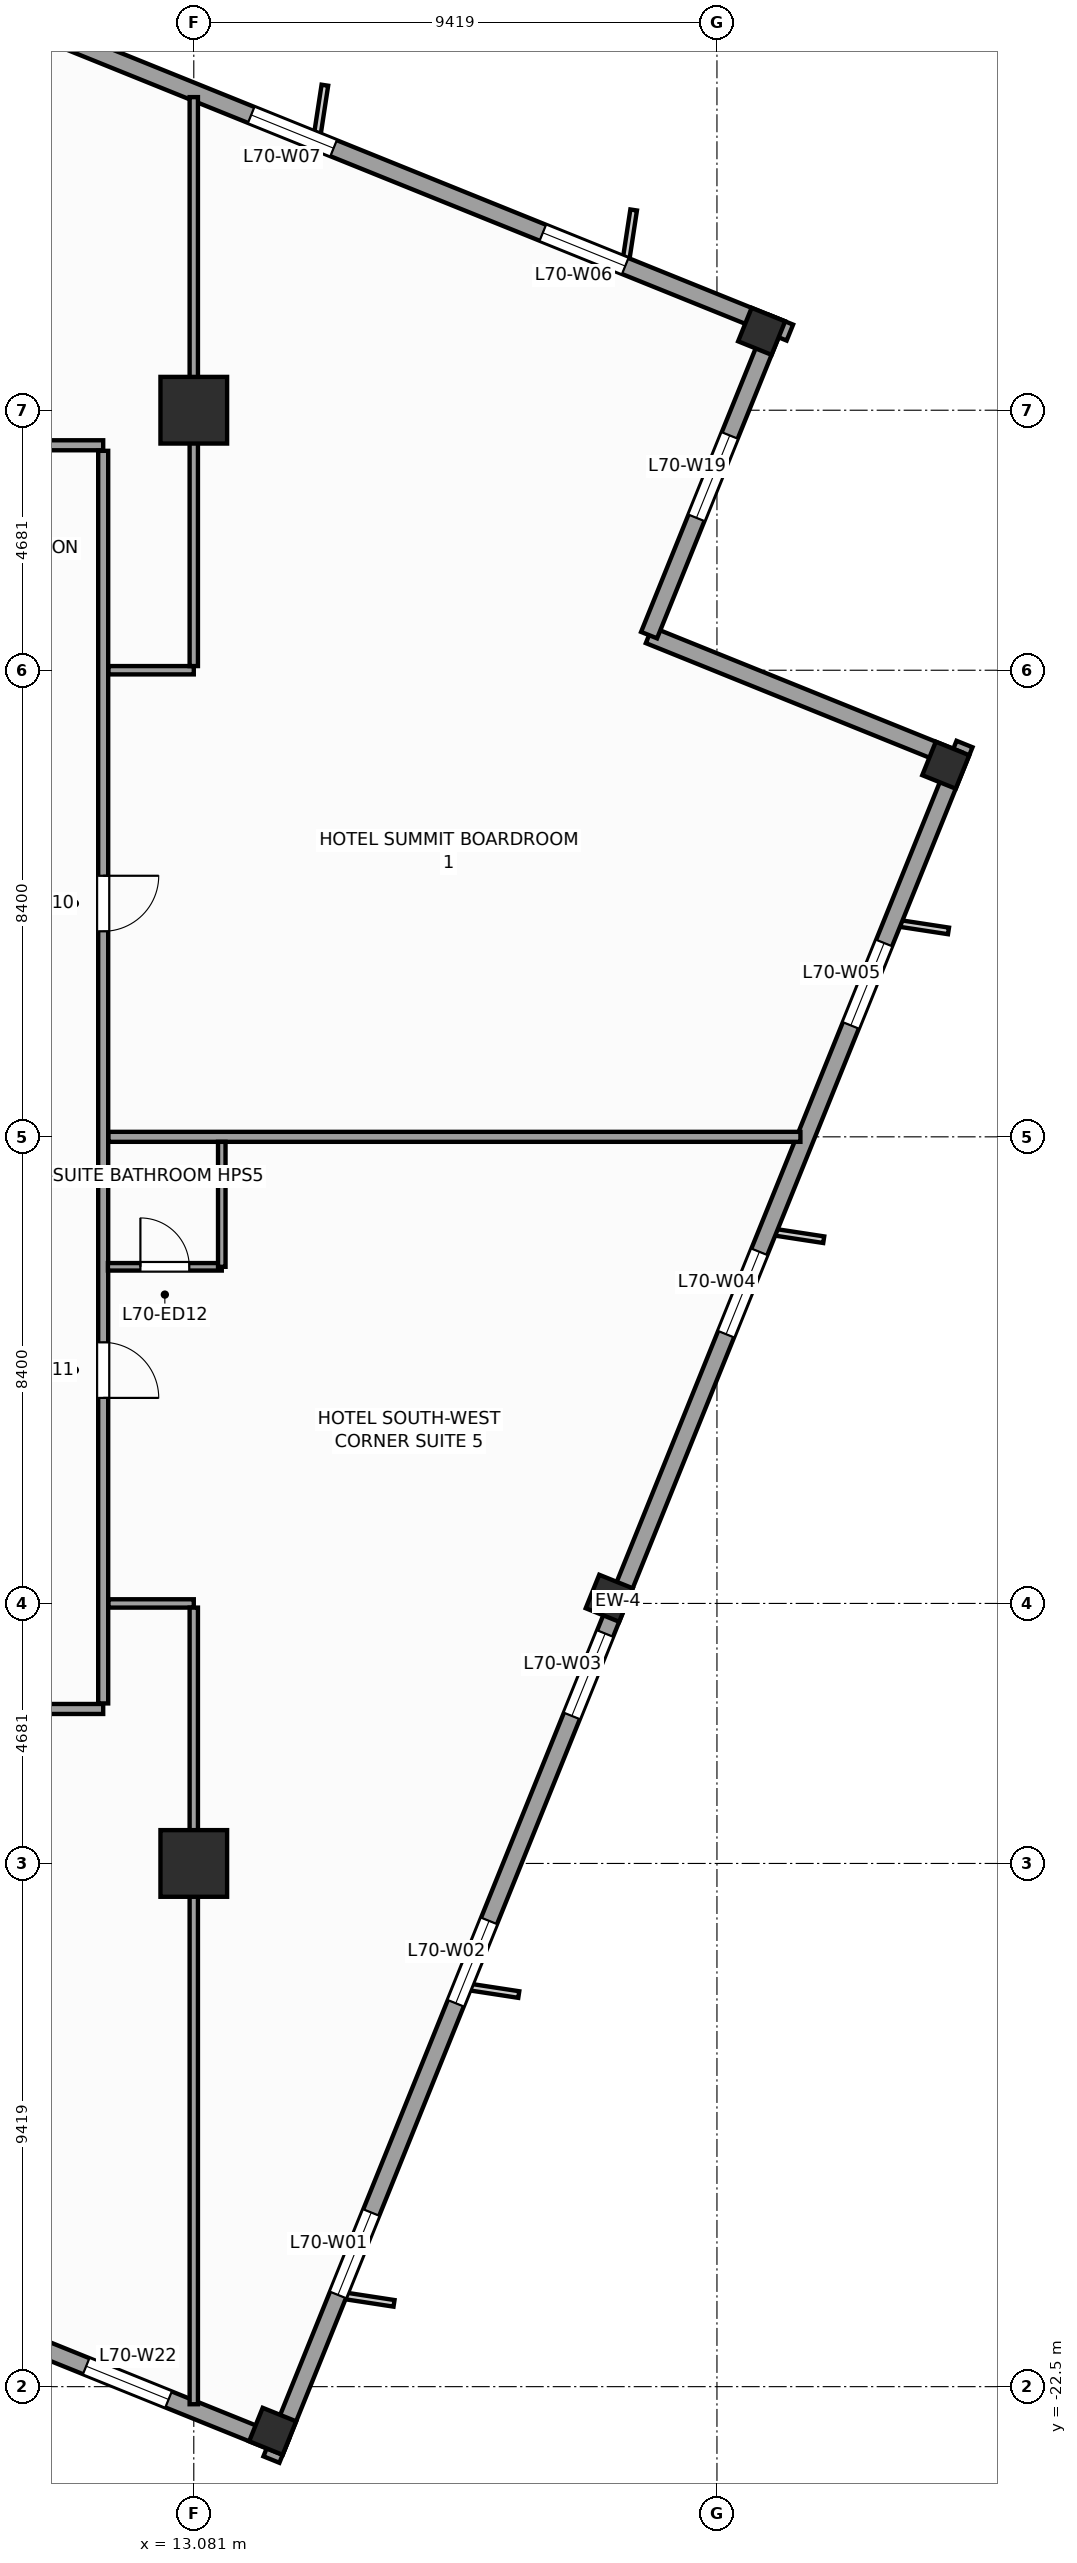
"""IFC4 building model, lengths in metres.
Left out: names, types, materials, properties, quantities, classifications, styles, units other than length and angle.
Written with IfcOpenShell. Run it as: python <this file> out.ifc"""

import sys

from ifc_helpers import new_model, si_unit, direction, frame, frame_2d, origin, origin_2d, place, context, subcontext, project, spatial, rectangle, extrude, source, transform, mapped, element, fill, save


model = new_model("IFC4")
c1 = context("Model", 3, precision=1e-05, world=origin(), true_north=direction((0.0, 1.0)))
c2 = subcontext(c1, "Body", "Model", "MODEL_VIEW")
j1 = project(units=[si_unit("LENGTHUNIT", "METRE"), si_unit("PLANEANGLEUNIT", "RADIAN")], contexts=[c1])
p1 = place(None, origin())
s1 = spatial("IfcSite", under=j1, at=p1, CompositionType="ELEMENT")
p2 = place(p1, origin())
s2 = spatial("IfcBuilding", under=s1, at=p2, CompositionType="ELEMENT")
p3 = place(p2, frame((0.0, 0.0, 286.8)))
s3 = spatial("IfcBuildingStorey", under=s2, at=p3, CompositionType="ELEMENT", Elevation=286.8)
m1 = source(origin(), c2, "Body", "SweptSolid", [
    extrude(rectangle(XDim=1.2, YDim=1.2, at=origin_2d()), origin(), (0.0, 0.0, 1.0), 3.6),
])
for number, where, z_axis, x_axis in (
    (1, (13.081, -13.081, 0.0), (0.0, 0.0, 1.0), (1.0, 0.0, 0.0)),
    (2, (13.081, 13.081, 0.0), (0.0, 0.0, 1.0), (1.0, 0.0, 0.0)),
):
    element("IfcColumn", number, at=place(p3, frame(where, z_axis=z_axis, x_axis=x_axis)), inside=s3, PredefinedType="COLUMN", context=c2, shape_type="MappedRepresentation", body=[
        mapped(m1, transform((0.0, 0.0, 0.0), scale=1.0)),
    ])
m2 = source(origin(), c2, "Body", "SweptSolid", [
    extrude(rectangle(XDim=0.65, YDim=0.65, at=origin_2d()), origin(), (0.0, 0.0, 1.0), 3.6),
])
for number, where, z_axis, x_axis in (
    (3, (14.501, -23.304, 0.0), (0.0, 0.0, 1.0), (0.375, 0.927, 0.0)),
    (4, (20.56, -8.307, 0.0), (0.0, 0.0, 1.0), (0.375, 0.927, 0.0)),
    (5, (26.62, 6.69, 0.0), (0.0, 0.0, 1.0), (0.375, 0.927, 0.0)),
    (6, (23.304, 14.501, 0.0), (0.0, 0.0, 1.0), (0.375, 0.927, 0.0)),
):
    element("IfcColumn", number, at=place(p3, frame(where, z_axis=z_axis, x_axis=x_axis)), inside=s3, PredefinedType="COLUMN", context=c2, shape_type="MappedRepresentation", body=[
        mapped(m2, transform((0.0, 0.0, 0.0), scale=1.0)),
    ])
p4 = place(p3, frame((14.479, -23.813, 0.0), z_axis=(0.0, 0.0, 1.0), x_axis=(0.374609557019, 0.927182657188, 0.0)))
e7 = element("IfcWall", 7, at=p4, inside=s3, PredefinedType="STANDARD", context=c2, shape_type="SweptSolid", body=[
    extrude(rectangle(XDim=33.31, YDim=0.31, at=frame_2d((16.655, 0.0))), origin(), (0.0, 0.0, 1.0), 2.75),
])
p5 = place(p4, frame((3.197, 0.0, 0.47)))
e8 = element("IfcOpeningElement", 8, at=p5, cuts=e7, PredefinedType="OPENING", context=c2, shape_type="SweptSolid", body=[
    extrude(rectangle(XDim=1.6, YDim=2.1, at=frame_2d((0.8, 1.05))), frame((0.0, 0.165, 0.0), z_axis=(0.0, -1.0, 0.0), x_axis=(1.0, 0.0, 0.0)), (0.0, 0.0, 1.0), 0.33),
])
p6 = place(p4, frame((8.86, 0.0, 0.47)))
e9 = element("IfcOpeningElement", 9, at=p6, cuts=e7, PredefinedType="OPENING", context=c2, shape_type="SweptSolid", body=[
    extrude(rectangle(XDim=1.6, YDim=2.1, at=frame_2d((0.8, 1.05))), frame((0.0, 0.165, 0.0), z_axis=(0.0, -1.0, 0.0), x_axis=(1.0, 0.0, 0.0)), (0.0, 0.0, 1.0), 0.33),
])
p7 = place(p4, frame((14.439, 0.0, 0.47)))
e10 = element("IfcOpeningElement", 10, at=p7, cuts=e7, PredefinedType="OPENING", context=c2, shape_type="SweptSolid", body=[
    extrude(rectangle(XDim=1.6, YDim=2.1, at=frame_2d((0.8, 1.05))), frame((0.0, 0.165, 0.0), z_axis=(0.0, -1.0, 0.0), x_axis=(1.0, 0.0, 0.0)), (0.0, 0.0, 1.0), 0.33),
])
p8 = place(p4, frame((21.851, 0.0, 0.47)))
e11 = element("IfcOpeningElement", 11, at=p8, cuts=e7, PredefinedType="OPENING", context=c2, shape_type="SweptSolid", body=[
    extrude(rectangle(XDim=1.6, YDim=2.1, at=frame_2d((0.8, 1.05))), frame((0.0, 0.165, 0.0), z_axis=(0.0, -1.0, 0.0), x_axis=(1.0, 0.0, 0.0)), (0.0, 0.0, 1.0), 0.33),
])
p9 = place(p4, frame((27.847, 0.0, 0.47)))
e12 = element("IfcOpeningElement", 12, at=p9, cuts=e7, PredefinedType="OPENING", context=c2, shape_type="SweptSolid", body=[
    extrude(rectangle(XDim=1.6, YDim=2.1, at=frame_2d((0.8, 1.05))), frame((0.0, 0.165, 0.0), z_axis=(0.0, -1.0, 0.0), x_axis=(1.0, 0.0, 0.0)), (0.0, 0.0, 1.0), 0.33),
])
p10 = place(p3, frame((26.841, 6.784, 0.0), z_axis=(0.0, 0.0, 1.0), x_axis=(-0.927171722085, 0.374636620962, 0.0)))
e13 = element("IfcWall", 13, at=p10, inside=s3, PredefinedType="STANDARD", context=c2, shape_type="SweptSolid", body=[
    extrude(rectangle(XDim=6.0, YDim=0.31, at=frame_2d((3.0, 0.0))), origin(), (0.0, 0.0, 1.0), 2.65),
])
p11 = place(p3, frame((21.278, 9.032, 0.0), z_axis=(0.0, 0.0, 1.0), x_axis=(0.374602739196, 0.927185411764, 0.0)))
e14 = element("IfcWall", 14, at=p11, inside=s3, PredefinedType="STANDARD", context=c2, shape_type="SweptSolid", body=[
    extrude(rectangle(XDim=6.155, YDim=0.31, at=frame_2d((3.078, 0.0))), origin(), (0.0, 0.0, 1.0), 3.35),
])
p12 = place(p11, frame((2.278, 0.0, 0.47)))
e15 = element("IfcOpeningElement", 15, at=p12, cuts=e14, PredefinedType="OPENING", context=c2, shape_type="SweptSolid", body=[
    extrude(rectangle(XDim=1.6, YDim=2.1, at=frame_2d((0.8, 1.05))), frame((0.0, 0.165, 0.0), z_axis=(0.0, -1.0, 0.0), x_axis=(1.0, 0.0, 0.0)), (0.0, 0.0, 1.0), 0.33),
])
p13 = place(p3, frame((23.813, 14.479, 0.0), z_axis=(0.0, 0.0, 1.0), x_axis=(-0.927182657188, 0.374609557019, 0.0)))
e16 = element("IfcWall", 16, at=p13, inside=s3, PredefinedType="STANDARD", context=c2, shape_type="SweptSolid", body=[
    extrude(rectangle(XDim=33.31, YDim=0.31, at=frame_2d((16.655, 0.0))), origin(), (0.0, 0.0, 1.0), 2.75),
])
p14 = place(p13, frame((22.58, 0.0, 0.0)))
e17 = element("IfcOpeningElement", 17, at=p14, cuts=e16, PredefinedType="OPENING", context=c2, shape_type="SweptSolid", body=[
    extrude(rectangle(XDim=1.05, YDim=2.25, at=frame_2d((0.525, 1.125))), frame((0.0, 0.165, 0.0), z_axis=(0.0, -1.0, 0.0), x_axis=(1.0, 0.0, 0.0)), (0.0, 0.0, 1.0), 0.33),
])
p15 = place(p13, frame((3.197, 0.0, 0.47)))
e18 = element("IfcOpeningElement", 18, at=p15, cuts=e16, PredefinedType="OPENING", context=c2, shape_type="SweptSolid", body=[
    extrude(rectangle(XDim=1.6, YDim=2.1, at=frame_2d((0.8, 1.05))), frame((0.0, 0.165, 0.0), z_axis=(0.0, -1.0, 0.0), x_axis=(1.0, 0.0, 0.0)), (0.0, 0.0, 1.0), 0.33),
])
p16 = place(p13, frame((8.86, 0.0, 0.47)))
e19 = element("IfcOpeningElement", 19, at=p16, cuts=e16, PredefinedType="OPENING", context=c2, shape_type="SweptSolid", body=[
    extrude(rectangle(XDim=1.6, YDim=2.1, at=frame_2d((0.8, 1.05))), frame((0.0, 0.165, 0.0), z_axis=(0.0, -1.0, 0.0), x_axis=(1.0, 0.0, 0.0)), (0.0, 0.0, 1.0), 0.33),
])
p17 = place(p13, frame((14.439, 0.0, 0.47)))
e20 = element("IfcOpeningElement", 20, at=p17, cuts=e16, PredefinedType="OPENING", context=c2, shape_type="SweptSolid", body=[
    extrude(rectangle(XDim=1.6, YDim=2.1, at=frame_2d((0.8, 1.05))), frame((0.0, 0.165, 0.0), z_axis=(0.0, -1.0, 0.0), x_axis=(1.0, 0.0, 0.0)), (0.0, 0.0, 1.0), 0.33),
])
p18 = place(p13, frame((27.847, 0.0, 0.47)))
e21 = element("IfcOpeningElement", 21, at=p18, cuts=e16, PredefinedType="OPENING", context=c2, shape_type="SweptSolid", body=[
    extrude(rectangle(XDim=1.6, YDim=2.1, at=frame_2d((0.8, 1.05))), frame((0.0, 0.165, 0.0), z_axis=(0.0, -1.0, 0.0), x_axis=(1.0, 0.0, 0.0)), (0.0, 0.0, 1.0), 0.33),
])
p19 = place(p3, frame((9.032, -21.278, 0.0), z_axis=(0.0, 0.0, 1.0), x_axis=(0.927185411764, -0.374602739196, 0.0)))
e22 = element("IfcWall", 22, at=p19, inside=s3, PredefinedType="STANDARD", context=c2, shape_type="SweptSolid", body=[
    extrude(rectangle(XDim=6.155, YDim=0.31, at=frame_2d((3.078, 0.0))), origin(), (0.0, 0.0, 1.0), 3.35),
])
p20 = place(p19, frame((2.278, 0.0, 0.47)))
e23 = element("IfcOpeningElement", 23, at=p20, cuts=e22, PredefinedType="OPENING", context=c2, shape_type="SweptSolid", body=[
    extrude(rectangle(XDim=1.6, YDim=2.1, at=frame_2d((0.8, 1.05))), frame((0.0, 0.165, 0.0), z_axis=(0.0, -1.0, 0.0), x_axis=(1.0, 0.0, 0.0)), (0.0, 0.0, 1.0), 0.33),
])
p21 = place(p3, frame((-11.35, -10.3, 0.0), z_axis=(0.0, 0.0, 1.0), x_axis=(1.0, 0.0, 0.0)))
e24 = element("IfcWall", 24, at=p21, inside=s3, PredefinedType="PARTITIONING", context=c2, shape_type="SweptSolid", body=[
    extrude(rectangle(XDim=22.8, YDim=0.18, at=frame_2d((11.4, 0.0))), origin(), (0.0, 0.0, 1.0), 3.35),
])
p22 = place(p21, frame((12.336, 0.0, 0.0)))
e25 = element("IfcOpeningElement", 25, at=p22, cuts=e24, PredefinedType="OPENING", context=c2, shape_type="SweptSolid", body=[
    extrude(rectangle(XDim=0.95, YDim=2.1, at=frame_2d((0.475, 1.05))), frame((0.0, 0.1, 0.0), z_axis=(0.0, -1.0, 0.0), x_axis=(1.0, 0.0, 0.0)), (0.0, 0.0, 1.0), 0.2),
])
p23 = place(p21, frame((17.71, 0.0, 0.0)))
e26 = element("IfcOpeningElement", 26, at=p23, cuts=e24, PredefinedType="OPENING", context=c2, shape_type="SweptSolid", body=[
    extrude(rectangle(XDim=1.0, YDim=2.15, at=frame_2d((0.5, 1.075))), frame((0.0, 0.1, 0.0), z_axis=(0.0, -1.0, 0.0), x_axis=(1.0, 0.0, 0.0)), (0.0, 0.0, 1.0), 0.2),
])
p24 = place(p21, frame((5.339, 0.0, 0.0)))
e27 = element("IfcOpeningElement", 27, at=p24, cuts=e24, PredefinedType="OPENING", context=c2, shape_type="SweptSolid", body=[
    extrude(rectangle(XDim=1.0, YDim=2.15, at=frame_2d((0.5, 1.075))), frame((0.0, 0.1, 0.0), z_axis=(0.0, -1.0, 0.0), x_axis=(1.0, 0.0, 0.0)), (0.0, 0.0, 1.0), 0.2),
])
p25 = place(p3, frame((-11.35, 12.45, 0.0), z_axis=(0.0, 0.0, 1.0), x_axis=(1.0, 0.0, 0.0)))
e28 = element("IfcWall", 28, at=p25, inside=s3, PredefinedType="PARTITIONING", context=c2, shape_type="SweptSolid", body=[
    extrude(rectangle(XDim=22.8, YDim=0.18, at=frame_2d((11.4, 0.0))), origin(), (0.0, 0.0, 1.0), 3.35),
])
p26 = place(p25, frame((6.089, 0.0, 0.0)))
e29 = element("IfcOpeningElement", 29, at=p26, cuts=e28, PredefinedType="OPENING", context=c2, shape_type="SweptSolid", body=[
    extrude(rectangle(XDim=1.0, YDim=2.15, at=frame_2d((0.5, 1.075))), frame((0.0, 0.1, 0.0), z_axis=(0.0, -1.0, 0.0), x_axis=(1.0, 0.0, 0.0)), (0.0, 0.0, 1.0), 0.2),
])
p27 = place(p25, frame((17.161, 0.0, 0.0)))
e30 = element("IfcOpeningElement", 30, at=p27, cuts=e28, PredefinedType="OPENING", context=c2, shape_type="SweptSolid", body=[
    extrude(rectangle(XDim=1.0, YDim=2.15, at=frame_2d((0.5, 1.075))), frame((0.0, 0.1, 0.0), z_axis=(0.0, -1.0, 0.0), x_axis=(1.0, 0.0, 0.0)), (0.0, 0.0, 1.0), 0.2),
])
p28 = place(p3, frame((11.45, -10.2, 0.0), z_axis=(0.0, 0.0, 1.0), x_axis=(0.0, 1.0, 0.0)))
e31 = element("IfcWall", 31, at=p28, inside=s3, PredefinedType="PARTITIONING", context=c2, shape_type="SweptSolid", body=[
    extrude(rectangle(XDim=22.55, YDim=0.18, at=frame_2d((11.275, 0.0))), origin(), (0.0, 0.0, 1.0), 3.35),
])
p29 = place(p28, frame((13.9, 0.0, 0.0)))
e32 = element("IfcOpeningElement", 32, at=p29, cuts=e31, PredefinedType="OPENING", context=c2, shape_type="SweptSolid", body=[
    extrude(rectangle(XDim=1.0, YDim=2.15, at=frame_2d((0.5, 1.075))), frame((0.0, 0.1, 0.0), z_axis=(0.0, -1.0, 0.0), x_axis=(1.0, 0.0, 0.0)), (0.0, 0.0, 1.0), 0.2),
])
p30 = place(p28, frame((5.5, 0.0, 0.0)))
e33 = element("IfcOpeningElement", 33, at=p30, cuts=e31, PredefinedType="OPENING", context=c2, shape_type="SweptSolid", body=[
    extrude(rectangle(XDim=1.0, YDim=2.15, at=frame_2d((0.5, 1.075))), frame((0.0, 0.1, 0.0), z_axis=(0.0, -1.0, 0.0), x_axis=(1.0, 0.0, 0.0)), (0.0, 0.0, 1.0), 0.2),
])
p31 = place(p3, frame((11.545, 0.0, 0.0), z_axis=(0.0, 0.0, 1.0), x_axis=(1.0, 0.0, 0.0)))
e34 = element("IfcWall", 34, at=p31, inside=s3, PredefinedType="PARTITIONING", context=c2, shape_type="SweptSolid", body=[
    extrude(rectangle(XDim=12.458, YDim=0.18, at=frame_2d((6.229, 0.0))), origin(), (0.0, 0.0, 1.0), 3.02),
])
p32 = place(p3, frame((11.545, 8.4, 0.0), z_axis=(0.0, 0.0, 1.0), x_axis=(1.0, 0.0, 0.0)))
e35 = element("IfcWall", 35, at=p32, inside=s3, PredefinedType="PARTITIONING", context=c2, shape_type="SweptSolid", body=[
    extrude(rectangle(XDim=1.536, YDim=0.15, at=frame_2d((0.768, 0.0))), origin(), (0.0, 0.0, 1.0), 3.35),
])
p33 = place(p3, frame((13.081, 8.475, 0.0), z_axis=(0.0, 0.0, 1.0), x_axis=(0.0, 1.0, 0.0)))
e36 = element("IfcWall", 36, at=p33, inside=s3, PredefinedType="PARTITIONING", context=c2, shape_type="SweptSolid", body=[
    extrude(rectangle(XDim=10.243, YDim=0.15, at=frame_2d((5.121, 0.0))), origin(), (0.0, 0.0, 1.0), 2.45),
])
p34 = place(p3, frame((11.545, -8.4, 0.0), z_axis=(0.0, 0.0, 1.0), x_axis=(1.0, 0.0, 0.0)))
e37 = element("IfcWall", 37, at=p34, inside=s3, PredefinedType="PARTITIONING", context=c2, shape_type="SweptSolid", body=[
    extrude(rectangle(XDim=1.536, YDim=0.15, at=frame_2d((0.768, 0.0))), origin(), (0.0, 0.0, 1.0), 3.35),
])
p35 = place(p3, frame((13.081, -8.475, 0.0), z_axis=(0.0, 0.0, 1.0), x_axis=(0.0, -1.0, 0.0)))
e38 = element("IfcWall", 38, at=p35, inside=s3, PredefinedType="PARTITIONING", context=c2, shape_type="SweptSolid", body=[
    extrude(rectangle(XDim=14.342, YDim=0.15, at=frame_2d((7.171, 0.0))), origin(), (0.0, 0.0, 1.0), 2.45),
])
p36 = place(p3, frame((11.535, -2.34, 0.0), z_axis=(0.0, 0.0, 1.0), x_axis=(1.0, 0.0, 0.0)))
e39 = element("IfcWall", 39, at=p36, inside=s3, PredefinedType="PARTITIONING", context=c2, shape_type="SweptSolid", body=[
    extrude(rectangle(XDim=2.05, YDim=0.135, at=frame_2d((1.025, 0.0))), origin(), (0.0, 0.0, 1.0), 3.02),
])
p37 = place(p36, frame((0.585, 0.0, 0.0)))
e40 = element("IfcOpeningElement", 40, at=p37, cuts=e39, PredefinedType="OPENING", context=c2, shape_type="SweptSolid", body=[
    extrude(rectangle(XDim=0.88, YDim=2.1, at=frame_2d((0.44, 1.05))), frame((0.0, 0.078, 0.0), z_axis=(0.0, -1.0, 0.0), x_axis=(1.0, 0.0, 0.0)), (0.0, 0.0, 1.0), 0.155),
])
p38 = place(p3, frame((13.585, -2.34, 0.0), z_axis=(0.0, 0.0, 1.0), x_axis=(0.0, 1.0, 0.0)))
e41 = element("IfcWall", 41, at=p38, inside=s3, PredefinedType="PARTITIONING", context=c2, shape_type="SweptSolid", body=[
    extrude(rectangle(XDim=2.25, YDim=0.135, at=frame_2d((1.125, 0.0))), origin(), (0.0, 0.0, 1.0), 3.35),
])
m3 = source(origin(), c2, "Body", "SweptSolid", [
    extrude(rectangle(XDim=1.6, YDim=2.1, at=frame_2d((0.8, 1.05))), frame((0.0, 0.03, 0.0), z_axis=(0.0, -1.0, 0.0), x_axis=(1.0, 0.0, 0.0)), (0.0, 0.0, 1.0), 0.06),
])
p39 = place(p5, origin())
e42 = element("IfcWindow", 42, at=p39, inside=s3, PartitioningType="SINGLE_PANEL", PredefinedType="WINDOW", context=c2, shape_type="MappedRepresentation", body=[
    mapped(m3, transform((0.0, 0.0, 0.0), scale=1.0)),
])
fill(e8, e42)
p40 = place(p6, origin())
e43 = element("IfcWindow", 43, at=p40, inside=s3, PartitioningType="SINGLE_PANEL", PredefinedType="WINDOW", context=c2, shape_type="MappedRepresentation", body=[
    mapped(m3, transform((0.0, 0.0, 0.0), scale=1.0)),
])
fill(e9, e43)
p41 = place(p7, origin())
e44 = element("IfcWindow", 44, at=p41, inside=s3, PartitioningType="SINGLE_PANEL", PredefinedType="WINDOW", context=c2, shape_type="MappedRepresentation", body=[
    mapped(m3, transform((0.0, 0.0, 0.0), scale=1.0)),
])
fill(e10, e44)
p42 = place(p8, origin())
e45 = element("IfcWindow", 45, at=p42, inside=s3, PartitioningType="SINGLE_PANEL", PredefinedType="WINDOW", context=c2, shape_type="MappedRepresentation", body=[
    mapped(m3, transform((0.0, 0.0, 0.0), scale=1.0)),
])
fill(e11, e45)
p43 = place(p9, origin())
e46 = element("IfcWindow", 46, at=p43, inside=s3, PartitioningType="SINGLE_PANEL", PredefinedType="WINDOW", context=c2, shape_type="MappedRepresentation", body=[
    mapped(m3, transform((0.0, 0.0, 0.0), scale=1.0)),
])
fill(e12, e46)
p44 = place(p15, origin())
e47 = element("IfcWindow", 47, at=p44, inside=s3, PartitioningType="SINGLE_PANEL", PredefinedType="WINDOW", context=c2, shape_type="MappedRepresentation", body=[
    mapped(m3, transform((0.0, 0.0, 0.0), scale=1.0)),
])
fill(e18, e47)
p45 = place(p16, origin())
e48 = element("IfcWindow", 48, at=p45, inside=s3, PartitioningType="SINGLE_PANEL", PredefinedType="WINDOW", context=c2, shape_type="MappedRepresentation", body=[
    mapped(m3, transform((0.0, 0.0, 0.0), scale=1.0)),
])
fill(e19, e48)
p46 = place(p12, origin())
e49 = element("IfcWindow", 49, at=p46, inside=s3, PartitioningType="SINGLE_PANEL", PredefinedType="WINDOW", context=c2, shape_type="MappedRepresentation", body=[
    mapped(m3, transform((0.0, 0.0, 0.0), scale=1.0)),
])
fill(e15, e49)
p47 = place(p20, origin())
e50 = element("IfcWindow", 50, at=p47, inside=s3, PartitioningType="SINGLE_PANEL", PredefinedType="WINDOW", context=c2, shape_type="MappedRepresentation", body=[
    mapped(m3, transform((0.0, 0.0, 0.0), scale=1.0)),
])
fill(e23, e50)
m4 = source(origin(), c2, "Body", "SweptSolid", [
    extrude(rectangle(XDim=1.0, YDim=2.15, at=frame_2d((0.5, 1.075))), frame((0.0, 0.025, 0.0), z_axis=(0.0, -1.0, 0.0), x_axis=(1.0, 0.0, 0.0)), (0.0, 0.0, 1.0), 0.05),
])
p48 = place(p29, frame((1.0, 0.0, 0.0), z_axis=(0.0, 0.0, 1.0), x_axis=(-1.0, 0.0, 0.0)))
e51 = element("IfcDoor", 51, at=p48, inside=s3, OperationType="SINGLE_SWING_RIGHT", PredefinedType="DOOR", context=c2, shape_type="MappedRepresentation", body=[
    mapped(m4, transform((0.0, 0.0, 0.0), scale=1.0)),
])
fill(e32, e51)
p49 = place(p30, frame((1.0, 0.0, 0.0), z_axis=(0.0, 0.0, 1.0), x_axis=(-1.0, 0.0, 0.0)))
e52 = element("IfcDoor", 52, at=p49, inside=s3, OperationType="SINGLE_SWING_LEFT", PredefinedType="DOOR", context=c2, shape_type="MappedRepresentation", body=[
    mapped(m4, transform((0.0, 0.0, 0.0), scale=1.0)),
])
fill(e33, e52)
m5 = source(origin(), c2, "Body", "SweptSolid", [
    extrude(rectangle(XDim=0.88, YDim=2.1, at=frame_2d((0.44, 1.05))), frame((0.0, 0.025, 0.0), z_axis=(0.0, -1.0, 0.0), x_axis=(1.0, 0.0, 0.0)), (0.0, 0.0, 1.0), 0.05),
])
p50 = place(p37, origin())
e53 = element("IfcDoor", 53, at=p50, inside=s3, OperationType="SINGLE_SWING_LEFT", PredefinedType="DOOR", context=c2, shape_type="MappedRepresentation", body=[
    mapped(m5, transform((0.0, 0.0, 0.0), scale=1.0)),
])
fill(e40, e53)
save(model, sys.argv[1])
